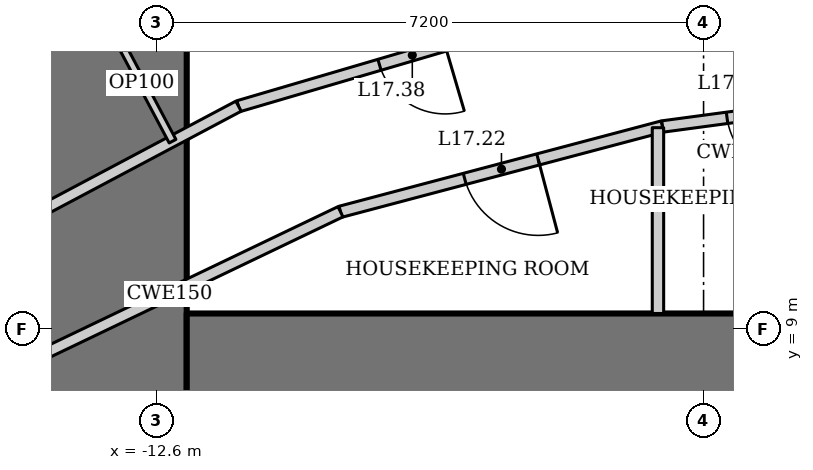
"""IFC4 building model, lengths in metres.
Left out: names, types, materials, properties, quantities, classifications, styles, units other than length and angle.
Written with IfcOpenShell. Run it as: python <this file> out.ifc"""

import sys

from ifc_helpers import new_model, si_unit, direction, frame, frame_2d, origin, place, context, subcontext, project, spatial, rectangle, extrude, element, fill, save


model = new_model("IFC4")
c1 = context("Model", 3, precision=1e-05, world=origin(), true_north=direction((0.0, 1.0)))
c2 = subcontext(c1, "Body", "Model", "MODEL_VIEW")
j1 = project(units=[si_unit("LENGTHUNIT", "METRE"), si_unit("PLANEANGLEUNIT", "RADIAN")], contexts=[c1])
p1 = place(None, origin())
s1 = spatial("IfcSite", under=j1, at=p1, CompositionType="ELEMENT")
p2 = place(p1, origin())
s2 = spatial("IfcBuilding", under=s1, at=p2, CompositionType="ELEMENT")
p3 = place(p2, frame((0.0, 0.0, 76.6)))
s3 = spatial("IfcBuildingStorey", under=s2, at=p3, CompositionType="ELEMENT", Elevation=76.6)
p4 = place(p3, frame((-13.2, 13.0, 0.0), z_axis=(0.0, 0.0, 1.0), x_axis=(0.0, -1.0, 0.0)))
e1 = element("IfcWall", 1, at=p4, inside=s3, PredefinedType="SHEAR", context=c2, shape_type="SweptSolid", body=[
    extrude(rectangle(XDim=26.0, YDim=2.0, at=frame_2d((13.0, 0.0))), origin(), (0.0, 0.0, 1.0), 3.6),
])
p5 = place(p4, frame((12.1, 0.0, 0.0)))
e2 = element("IfcOpeningElement", 2, at=p5, cuts=e1, PredefinedType="OPENING", context=c2, shape_type="SweptSolid", body=[
    extrude(rectangle(XDim=1.8, YDim=2.1, at=frame_2d((0.9, 1.05))), frame((0.0, 1.01, 0.0), z_axis=(0.0, -1.0, 0.0), x_axis=(1.0, 0.0, 0.0)), (0.0, 0.0, 1.0), 2.02),
])
p6 = place(p3, frame((12.2, 8.0, 0.0), z_axis=(0.0, 0.0, 1.0), x_axis=(-1.0, 0.0, 0.0)))
e3 = element("IfcWall", 3, at=p6, inside=s3, PredefinedType="SHEAR", context=c2, shape_type="SweptSolid", body=[
    extrude(rectangle(XDim=24.4, YDim=2.4, at=frame_2d((12.2, 0.0))), origin(), (0.0, 0.0, 1.0), 3.6),
])
p7 = place(p3, frame((-6.786, 13.317, 0.0), z_axis=(0.0, 0.0, 1.0), x_axis=(-0.959496227294, -0.281721475589, 0.0)))
e4 = element("IfcWall", 4, at=p7, inside=s3, PredefinedType="PARTITIONING", context=c2, shape_type="SweptSolid", body=[
    extrude(rectangle(XDim=4.933, YDim=0.15, at=frame_2d((2.466, 0.0))), origin(), (0.0, 0.0, 1.0), 3.45),
])
p8 = place(p7, frame((2.1, 0.0, 0.0)))
e5 = element("IfcOpeningElement", 5, at=p8, cuts=e4, PredefinedType="OPENING", context=c2, shape_type="SweptSolid", body=[
    extrude(rectangle(XDim=0.9, YDim=2.1, at=frame_2d((0.45, 1.05))), frame((0.0, 0.085, 0.0), z_axis=(0.0, -1.0, 0.0), x_axis=(1.0, 0.0, 0.0)), (0.0, 0.0, 1.0), 0.17),
])
p9 = place(p3, frame((-11.519, 11.928, 0.0), z_axis=(0.0, 0.0, 1.0), x_axis=(-0.883334368785, -0.468743419071, 0.0)))
e6 = element("IfcWall", 6, at=p9, inside=s3, PredefinedType="PARTITIONING", context=c2, shape_type="SweptSolid", body=[
    extrude(rectangle(XDim=5.491, YDim=0.15, at=frame_2d((2.746, 0.0))), origin(), (0.0, 0.0, 1.0), 3.45),
])
p10 = place(p3, frame((-2.79, 12.083, 0.0), z_axis=(0.0, 0.0, 1.0), x_axis=(-0.991129053928, -0.13290296633, 0.0)))
e7 = element("IfcWall", 7, at=p10, inside=s3, PredefinedType="PARTITIONING", context=c2, shape_type="SweptSolid", body=[
    extrude(rectangle(XDim=3.18, YDim=0.15, at=frame_2d((1.59, 0.0))), origin(), (0.0, 0.0, 1.0), 3.45),
])
p11 = place(p10, frame((0.1, 0.0, 0.0)))
e8 = element("IfcOpeningElement", 8, at=p11, cuts=e7, PredefinedType="OPENING", context=c2, shape_type="SweptSolid", body=[
    extrude(rectangle(XDim=0.9, YDim=2.1, at=frame_2d((0.45, 1.05))), frame((0.0, 0.085, 0.0), z_axis=(0.0, -1.0, 0.0), x_axis=(1.0, 0.0, 0.0)), (0.0, 0.0, 1.0), 0.17),
])
p12 = place(p10, frame((1.422, 0.0, 0.0)))
e9 = element("IfcOpeningElement", 9, at=p12, cuts=e7, PredefinedType="OPENING", context=c2, shape_type="SweptSolid", body=[
    extrude(rectangle(XDim=0.9, YDim=2.1, at=frame_2d((0.45, 1.05))), frame((0.0, 0.085, 0.0), z_axis=(0.0, -1.0, 0.0), x_axis=(1.0, 0.0, 0.0)), (0.0, 0.0, 1.0), 0.17),
])
p13 = place(p3, frame((-5.941, 11.66, 0.0), z_axis=(0.0, 0.0, 1.0), x_axis=(-0.966672790407, -0.256015070428, 0.0)))
e10 = element("IfcWall", 10, at=p13, inside=s3, PredefinedType="PARTITIONING", context=c2, shape_type="SweptSolid", body=[
    extrude(rectangle(XDim=4.382, YDim=0.15, at=frame_2d((2.191, 0.0))), origin(), (0.0, 0.0, 1.0), 3.45),
])
p14 = place(p13, frame((1.691, 0.0, 0.0)))
e11 = element("IfcOpeningElement", 11, at=p14, cuts=e10, PredefinedType="OPENING", context=c2, shape_type="SweptSolid", body=[
    extrude(rectangle(XDim=1.0, YDim=2.1, at=frame_2d((0.5, 1.05))), frame((0.0, 0.085, 0.0), z_axis=(0.0, -1.0, 0.0), x_axis=(1.0, 0.0, 0.0)), (0.0, 0.0, 1.0), 0.17),
])
p15 = place(p3, frame((-10.177, 10.539, 0.0), z_axis=(0.0, 0.0, 1.0), x_axis=(-0.901869692799, -0.43200816799, 0.0)))
e12 = element("IfcWall", 12, at=p15, inside=s3, PredefinedType="PARTITIONING", context=c2, shape_type="SweptSolid", body=[
    extrude(rectangle(XDim=4.986, YDim=0.15, at=frame_2d((2.493, 0.0))), origin(), (0.0, 0.0, 1.0), 3.45),
])
p16 = place(p3, frame((-6.0, 9.2, 0.0), z_axis=(0.0, 0.0, 1.0), x_axis=(0.0, 1.0, 0.0)))
e13 = element("IfcWall", 13, at=p16, inside=s3, PredefinedType="SOLIDWALL", context=c2, shape_type="SweptSolid", body=[
    extrude(rectangle(XDim=2.445, YDim=0.15, at=frame_2d((1.222, 0.0))), origin(), (0.0, 0.0, 1.0), 3.046),
])
p17 = place(p3, frame((-13.2, 13.0, 0.0), z_axis=(0.0, 0.0, 1.0), x_axis=(0.46874717052, -0.88333237806, 0.0)))
e14 = element("IfcWall", 14, at=p17, inside=s3, PredefinedType="PARTITIONING", context=c2, shape_type="SweptSolid", body=[
    extrude(rectangle(XDim=1.735, YDim=0.1, at=frame_2d((0.868, 0.0))), origin(), (0.0, 0.0, 1.0), 3.45),
])
p18 = place(p12, origin())
e15 = element("IfcDoor", 15, at=p18, inside=s3, OperationType="SINGLE_SWING_LEFT", PredefinedType="DOOR", context=c2, shape_type="SweptSolid", body=[
    extrude(rectangle(XDim=0.9, YDim=2.1, at=frame_2d((0.45, 1.05))), frame((0.0, 0.025, 0.0), z_axis=(0.0, -1.0, 0.0), x_axis=(1.0, 0.0, 0.0)), (0.0, 0.0, 1.0), 0.05),
])
fill(e9, e15)
p19 = place(p14, origin())
e16 = element("IfcDoor", 16, at=p19, inside=s3, OperationType="SINGLE_SWING_LEFT", PredefinedType="DOOR", context=c2, shape_type="SweptSolid", body=[
    extrude(rectangle(XDim=1.0, YDim=2.1, at=frame_2d((0.5, 1.05))), frame((0.0, 0.025, 0.0), z_axis=(0.0, -1.0, 0.0), x_axis=(1.0, 0.0, 0.0)), (0.0, 0.0, 1.0), 0.05),
])
fill(e11, e16)
p20 = place(p8, origin())
e17 = element("IfcDoor", 17, at=p20, inside=s3, OperationType="SINGLE_SWING_LEFT", PredefinedType="DOOR", context=c2, shape_type="SweptSolid", body=[
    extrude(rectangle(XDim=0.9, YDim=2.1, at=frame_2d((0.45, 1.05))), frame((0.0, 0.025, 0.0), z_axis=(0.0, -1.0, 0.0), x_axis=(1.0, 0.0, 0.0)), (0.0, 0.0, 1.0), 0.05),
])
fill(e5, e17)
save(model, sys.argv[1])
